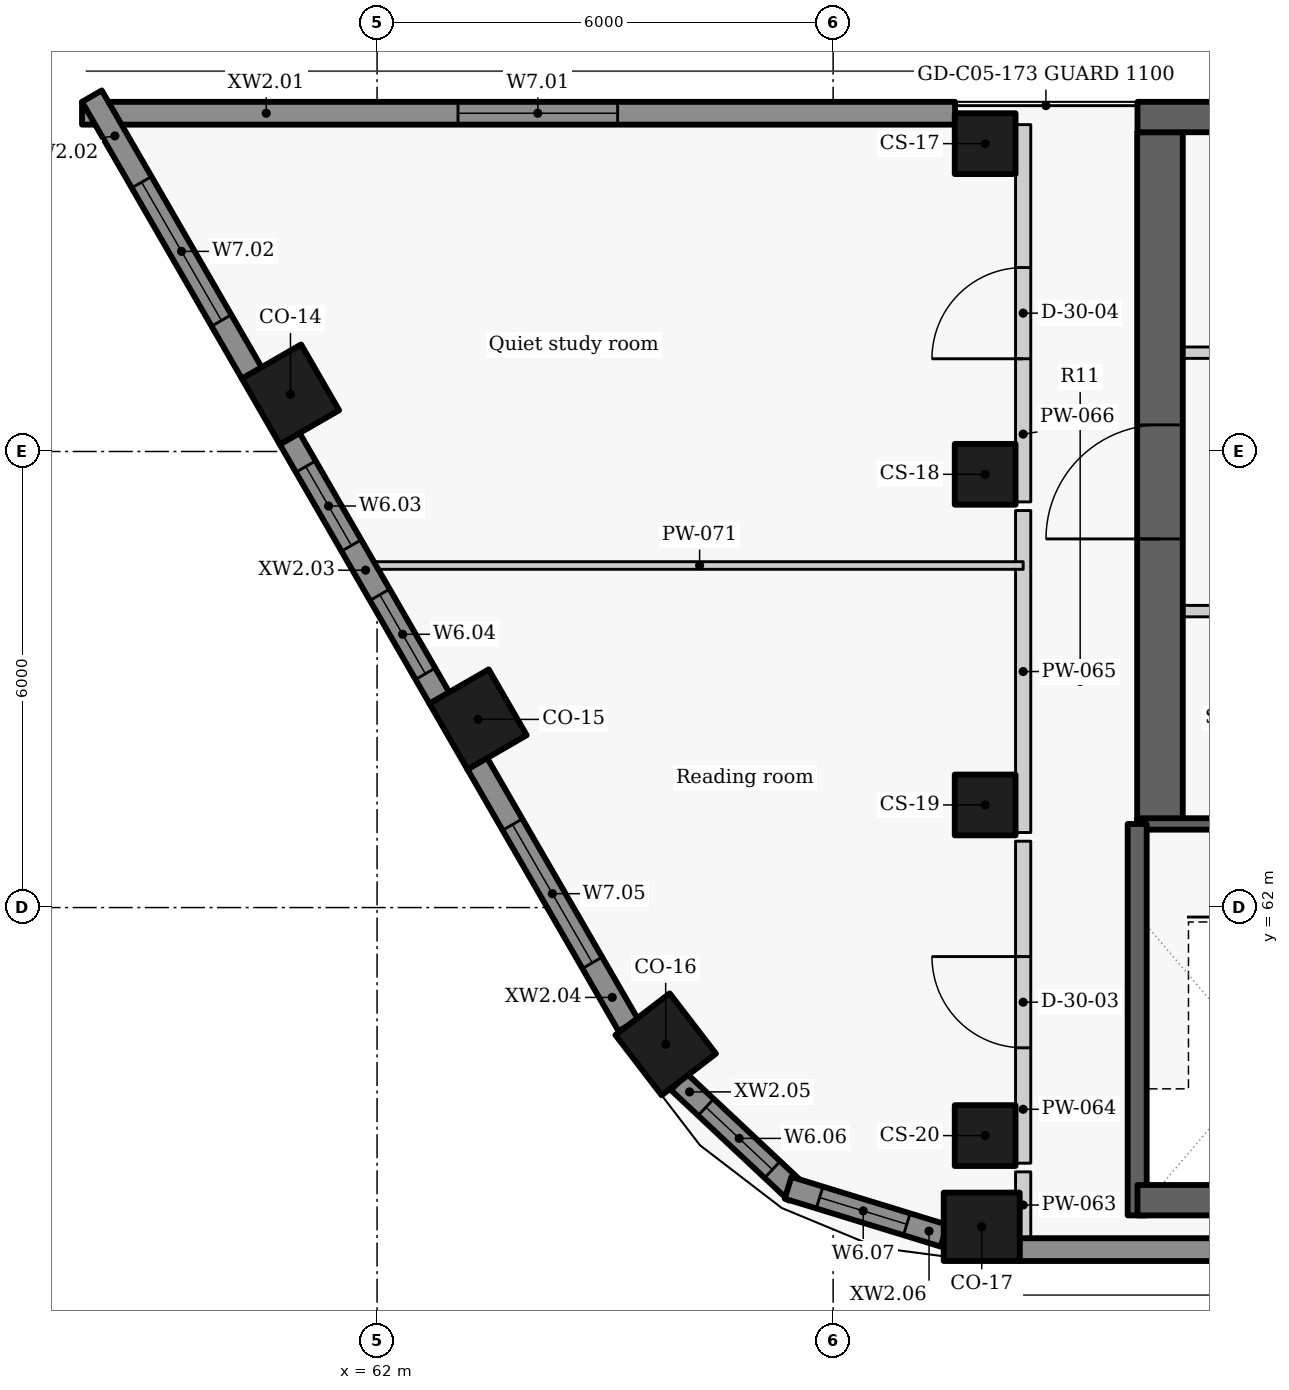
"""IFC4 building model, lengths in metres.
Left out: names, types, materials, properties, quantities, classifications, styles, units other than length and angle.
Written with IfcOpenShell. Run it as: python <this file> out.ifc"""

import sys

from ifc_helpers import new_model, si_unit, direction, frame, frame_2d, origin, origin_2d, place, context, subcontext, project, spatial, rectangle, extrude, element, fill, save


model = new_model("IFC4")
c1 = context("Model", 3, precision=1e-05, world=origin(), true_north=direction((0.0, 1.0)))
c2 = subcontext(c1, "Body", "Model", "MODEL_VIEW")
j1 = project(units=[si_unit("LENGTHUNIT", "METRE"), si_unit("PLANEANGLEUNIT", "RADIAN")], contexts=[c1])
p1 = place(None, origin())
s1 = spatial("IfcSite", under=j1, at=p1, CompositionType="ELEMENT")
p2 = place(p1, origin())
s2 = spatial("IfcBuilding", under=s1, at=p2, CompositionType="ELEMENT")
p3 = place(p2, frame((0.0, 0.0, 286.8)))
s3 = spatial("IfcBuildingStorey", under=s2, at=p3, CompositionType="ELEMENT", Elevation=286.8)
for number, where, z_axis, x_axis in (
    (1, (60.861, 68.75, 0.0), (0.0, 0.0, 1.0), (0.5, -0.866, 0.0)),
    (2, (63.329, 64.475, 0.0), (0.0, 0.0, 1.0), (0.5, -0.866, 0.0)),
    (3, (65.797, 60.2, 0.0), (0.0, 0.0, 1.0), (0.609, -0.793, 0.0)),
    (4, (69.955, 57.8, 0.0), (0.0, 0.0, 1.0), (1.0, 0.0, 0.0)),
):
    element("IfcColumn", number, at=place(p3, frame(where, z_axis=z_axis, x_axis=x_axis)), inside=s3, PredefinedType="COLUMN", context=c2, shape_type="SweptSolid", body=[
        extrude(rectangle(XDim=1.0, YDim=0.9, at=origin_2d()), origin(), (0.0, 0.0, 1.0), 3.6),
    ])
for number, where, z_axis, x_axis in (
    (5, (70.0, 72.05, 0.0), (0.0, 0.0, 1.0), (0.0, -1.0, 0.0)),
    (6, (70.0, 67.7, 0.0), (0.0, 0.0, 1.0), (0.0, -1.0, 0.0)),
    (7, (70.0, 63.35, 0.0), (0.0, 0.0, 1.0), (0.0, -1.0, 0.0)),
    (8, (70.0, 59.0, 0.0), (0.0, 0.0, 1.0), (0.0, -1.0, 0.0)),
):
    element("IfcColumn", number, at=place(p3, frame(where, z_axis=z_axis, x_axis=x_axis)), inside=s3, PredefinedType="COLUMN", context=c2, shape_type="SweptSolid", body=[
        extrude(rectangle(XDim=0.8, YDim=0.8, at=origin_2d()), origin(), (0.0, 0.0, 1.0), 3.6),
    ])
p4 = place(p3, frame((69.604, 72.45, 0.0), z_axis=(0.0, 0.0, 1.0), x_axis=(-1.0, 0.0, 0.0)))
e9 = element("IfcWall", 9, at=p4, inside=s3, PredefinedType="SOLIDWALL", context=c2, shape_type="SweptSolid", body=[
    extrude(rectangle(XDim=11.486, YDim=0.3, at=frame_2d((5.743, 0.0))), origin(), (0.0, 0.0, 1.0), 2.725),
])
p5 = place(p4, frame((4.439, 0.0, 0.9)))
e10 = element("IfcOpeningElement", 10, at=p5, cuts=e9, PredefinedType="OPENING", context=c2, shape_type="SweptSolid", body=[
    extrude(rectangle(XDim=2.1, YDim=1.1, at=frame_2d((1.05, 0.55))), frame((0.0, 0.16, 0.0), z_axis=(0.0, -1.0, 0.0), x_axis=(1.0, 0.0, 0.0)), (0.0, 0.0, 1.0), 0.32),
])
p6 = place(p3, frame((58.248, 72.675, 0.0), z_axis=(0.0, 0.0, 1.0), x_axis=(0.499981865284, -0.866035873614, 0.0)))
e11 = element("IfcWall", 11, at=p6, inside=s3, PredefinedType="SOLIDWALL", context=c2, shape_type="SweptSolid", body=[
    extrude(rectangle(XDim=4.209, YDim=0.3, at=frame_2d((2.104, 0.0))), origin(), (0.0, 0.0, 1.0), 2.725),
])
p7 = place(p6, frame((1.308, 0.0, 0.9)))
e12 = element("IfcOpeningElement", 12, at=p7, cuts=e11, PredefinedType="OPENING", context=c2, shape_type="SweptSolid", body=[
    extrude(rectangle(XDim=2.1, YDim=1.1, at=frame_2d((1.05, 0.55))), frame((0.0, 0.16, 0.0), z_axis=(0.0, -1.0, 0.0), x_axis=(1.0, 0.0, 0.0)), (0.0, 0.0, 1.0), 0.32),
])
p8 = place(p3, frame((60.849, 68.171, 0.0), z_axis=(0.0, 0.0, 1.0), x_axis=(0.499986771468, -0.866033041146, 0.0)))
e13 = element("IfcWall", 13, at=p8, inside=s3, PredefinedType="SOLIDWALL", context=c2, shape_type="SweptSolid", body=[
    extrude(rectangle(XDim=3.944, YDim=0.3, at=frame_2d((1.972, 0.0))), origin(), (0.0, 0.0, 1.0), 2.725),
])
p9 = place(p8, frame((0.426, 0.0, 0.9)))
e14 = element("IfcOpeningElement", 14, at=p9, cuts=e13, PredefinedType="OPENING", context=c2, shape_type="SweptSolid", body=[
    extrude(rectangle(XDim=1.2, YDim=1.1, at=frame_2d((0.6, 0.55))), frame((0.0, 0.16, 0.0), z_axis=(0.0, -1.0, 0.0), x_axis=(1.0, 0.0, 0.0)), (0.0, 0.0, 1.0), 0.32),
])
p10 = place(p8, frame((2.374, 0.0, 0.9)))
e15 = element("IfcOpeningElement", 15, at=p10, cuts=e13, PredefinedType="OPENING", context=c2, shape_type="SweptSolid", body=[
    extrude(rectangle(XDim=1.2, YDim=1.1, at=frame_2d((0.6, 0.55))), frame((0.0, 0.16, 0.0), z_axis=(0.0, -1.0, 0.0), x_axis=(1.0, 0.0, 0.0)), (0.0, 0.0, 1.0), 0.32),
])
p11 = place(p3, frame((63.317, 63.896, 0.0), z_axis=(0.0, 0.0, 1.0), x_axis=(0.500005687176, -0.866022120267, 0.0)))
e16 = element("IfcWall", 16, at=p11, inside=s3, PredefinedType="SOLIDWALL", context=c2, shape_type="SweptSolid", body=[
    extrude(rectangle(XDim=3.979, YDim=0.3, at=frame_2d((1.99, 0.0))), origin(), (0.0, 0.0, 1.0), 2.725),
])
p12 = place(p11, frame((0.928, 0.0, 0.9)))
e17 = element("IfcOpeningElement", 17, at=p12, cuts=e16, PredefinedType="OPENING", context=c2, shape_type="SweptSolid", body=[
    extrude(rectangle(XDim=2.1, YDim=1.1, at=frame_2d((1.05, 0.55))), frame((0.0, 0.16, 0.0), z_axis=(0.0, -1.0, 0.0), x_axis=(1.0, 0.0, 0.0)), (0.0, 0.0, 1.0), 0.32),
])
p13 = place(p3, frame((65.97, 59.708, 0.0), z_axis=(0.0, 0.0, 1.0), x_axis=(0.72926487109, -0.684231501609, 0.0)))
e18 = element("IfcWall", 18, at=p13, inside=s3, PredefinedType="SOLIDWALL", context=c2, shape_type="SweptSolid", body=[
    extrude(rectangle(XDim=2.125, YDim=0.3, at=frame_2d((1.062, 0.0))), origin(), (0.0, 0.0, 1.0), 2.725),
])
p14 = place(p13, frame((0.489, 0.0, 0.9)))
e19 = element("IfcOpeningElement", 19, at=p14, cuts=e18, PredefinedType="OPENING", context=c2, shape_type="SweptSolid", body=[
    extrude(rectangle(XDim=1.2, YDim=1.1, at=frame_2d((0.6, 0.55))), frame((0.0, 0.16, 0.0), z_axis=(0.0, -1.0, 0.0), x_axis=(1.0, 0.0, 0.0)), (0.0, 0.0, 1.0), 0.32),
])
p15 = place(p3, frame((67.407, 58.313, 0.0), z_axis=(0.0, 0.0, 1.0), x_axis=(0.955955937739, -0.293510212944, 0.0)))
e20 = element("IfcWall", 20, at=p15, inside=s3, PredefinedType="SOLIDWALL", context=c2, shape_type="SweptSolid", body=[
    extrude(rectangle(XDim=2.146, YDim=0.3, at=frame_2d((1.073, 0.0))), origin(), (0.0, 0.0, 1.0), 2.725),
])
p16 = place(p15, frame((0.435, 0.0, 0.9)))
e21 = element("IfcOpeningElement", 21, at=p16, cuts=e20, PredefinedType="OPENING", context=c2, shape_type="SweptSolid", body=[
    extrude(rectangle(XDim=1.2, YDim=1.1, at=frame_2d((0.6, 0.55))), frame((0.0, 0.16, 0.0), z_axis=(0.0, -1.0, 0.0), x_axis=(1.0, 0.0, 0.0)), (0.0, 0.0, 1.0), 0.32),
])
p17 = place(p3, frame((70.451, 57.5, 0.0), z_axis=(0.0, 0.0, 1.0), x_axis=(1.0, 0.0, 0.0)))
e22 = element("IfcWall", 22, at=p17, inside=s3, PredefinedType="SOLIDWALL", context=c2, shape_type="SweptSolid", body=[
    extrude(rectangle(XDim=19.093, YDim=0.3, at=frame_2d((9.546, 0.0))), origin(), (0.0, 0.0, 1.0), 2.725),
])
p18 = place(p3, frame((72.0, 69.3, 0.0), z_axis=(0.0, 0.0, 1.0), x_axis=(1.0, 0.0, 0.0)))
e23 = element("IfcWall", 23, at=p18, inside=s3, PredefinedType="PARTITIONING", context=c2, shape_type="SweptSolid", body=[
    extrude(rectangle(XDim=13.4, YDim=0.15, at=frame_2d((6.7, 0.0))), origin(), (0.0, 0.0, 1.0), 3.325),
])
p19 = place(p18, frame((1.175, 0.0, 0.0)))
e24 = element("IfcOpeningElement", 24, at=p19, cuts=e23, PredefinedType="OPENING", context=c2, shape_type="SweptSolid", body=[
    extrude(rectangle(XDim=0.9, YDim=2.1, at=frame_2d((0.45, 1.05))), frame((0.0, 0.085, 0.0), z_axis=(0.0, -1.0, 0.0), x_axis=(1.0, 0.0, 0.0)), (0.0, 0.0, 1.0), 0.17),
])
p20 = place(p18, frame((4.85, 0.0, 0.0)))
e25 = element("IfcOpeningElement", 25, at=p20, cuts=e23, PredefinedType="OPENING", context=c2, shape_type="SweptSolid", body=[
    extrude(rectangle(XDim=0.9, YDim=2.1, at=frame_2d((0.45, 1.05))), frame((0.0, 0.085, 0.0), z_axis=(0.0, -1.0, 0.0), x_axis=(1.0, 0.0, 0.0)), (0.0, 0.0, 1.0), 0.17),
])
p21 = place(p18, frame((8.9, 0.0, 0.0)))
e26 = element("IfcOpeningElement", 26, at=p21, cuts=e23, PredefinedType="OPENING", context=c2, shape_type="SweptSolid", body=[
    extrude(rectangle(XDim=0.9, YDim=2.1, at=frame_2d((0.45, 1.05))), frame((0.0, 0.085, 0.0), z_axis=(0.0, -1.0, 0.0), x_axis=(1.0, 0.0, 0.0)), (0.0, 0.0, 1.0), 0.17),
])
p22 = place(p18, frame((11.6, 0.0, 0.0)))
e27 = element("IfcOpeningElement", 27, at=p22, cuts=e23, PredefinedType="OPENING", context=c2, shape_type="SweptSolid", body=[
    extrude(rectangle(XDim=0.9, YDim=2.1, at=frame_2d((0.45, 1.05))), frame((0.0, 0.085, 0.0), z_axis=(0.0, -1.0, 0.0), x_axis=(1.0, 0.0, 0.0)), (0.0, 0.0, 1.0), 0.17),
])
p23 = place(p3, frame((72.3, 63.1, -0.275), z_axis=(0.0, 0.0, 1.0), x_axis=(0.0, 1.0, 0.0)))
e28 = element("IfcWall", 28, at=p23, inside=s3, PredefinedType="SHEAR", context=c2, shape_type="SweptSolid", body=[
    extrude(rectangle(XDim=9.1, YDim=0.6, at=frame_2d((4.55, 0.0))), origin(), (0.0, 0.0, 1.0), 3.6),
])
p24 = place(p23, frame((3.75, 0.0, 0.275)))
e29 = element("IfcOpeningElement", 29, at=p24, cuts=e28, PredefinedType="OPENING", context=c2, shape_type="SweptSolid", body=[
    extrude(rectangle(XDim=1.5, YDim=2.1, at=frame_2d((0.75, 1.05))), frame((0.0, 0.31, 0.0), z_axis=(0.0, -1.0, 0.0), x_axis=(1.0, 0.0, 0.0)), (0.0, 0.0, 1.0), 0.62),
])
p25 = place(p3, frame((82.703, 65.9, 0.0), z_axis=(0.0, 0.0, 1.0), x_axis=(-1.0, 0.0, 0.0)))
e30 = element("IfcWall", 30, at=p25, inside=s3, PredefinedType="PARTITIONING", context=c2, shape_type="SweptSolid", body=[
    extrude(rectangle(XDim=10.703, YDim=0.15, at=frame_2d((5.352, 0.0))), origin(), (0.0, 0.0, 1.0), 3.325),
])
p26 = place(p25, frame((8.528, 0.0, 0.0)))
e31 = element("IfcOpeningElement", 31, at=p26, cuts=e30, PredefinedType="OPENING", context=c2, shape_type="SweptSolid", body=[
    extrude(rectangle(XDim=1.1, YDim=2.1, at=frame_2d((0.55, 1.05))), frame((0.0, 0.085, 0.0), z_axis=(0.0, -1.0, 0.0), x_axis=(1.0, 0.0, 0.0)), (0.0, 0.0, 1.0), 0.17),
])
p27 = place(p25, frame((6.978, 0.0, 0.0)))
e32 = element("IfcOpeningElement", 32, at=p27, cuts=e30, PredefinedType="OPENING", context=c2, shape_type="SweptSolid", body=[
    extrude(rectangle(XDim=0.9, YDim=2.1, at=frame_2d((0.45, 1.05))), frame((0.0, 0.085, 0.0), z_axis=(0.0, -1.0, 0.0), x_axis=(1.0, 0.0, 0.0)), (0.0, 0.0, 1.0), 0.17),
])
p28 = place(p25, frame((5.628, 0.0, 0.0)))
e33 = element("IfcOpeningElement", 33, at=p28, cuts=e30, PredefinedType="OPENING", context=c2, shape_type="SweptSolid", body=[
    extrude(rectangle(XDim=0.9, YDim=2.1, at=frame_2d((0.45, 1.05))), frame((0.0, 0.085, 0.0), z_axis=(0.0, -1.0, 0.0), x_axis=(1.0, 0.0, 0.0)), (0.0, 0.0, 1.0), 0.17),
])
p29 = place(p25, frame((3.453, 0.0, 0.0)))
e34 = element("IfcOpeningElement", 34, at=p29, cuts=e30, PredefinedType="OPENING", context=c2, shape_type="SweptSolid", body=[
    extrude(rectangle(XDim=1.2, YDim=2.1, at=frame_2d((0.6, 1.05))), frame((0.0, 0.085, 0.0), z_axis=(0.0, -1.0, 0.0), x_axis=(1.0, 0.0, 0.0)), (0.0, 0.0, 1.0), 0.17),
])
p30 = place(p25, frame((0.903, 0.0, 0.0)))
e35 = element("IfcOpeningElement", 35, at=p30, cuts=e30, PredefinedType="OPENING", context=c2, shape_type="SweptSolid", body=[
    extrude(rectangle(XDim=0.9, YDim=2.1, at=frame_2d((0.45, 1.05))), frame((0.0, 0.085, 0.0), z_axis=(0.0, -1.0, 0.0), x_axis=(1.0, 0.0, 0.0)), (0.0, 0.0, 1.0), 0.17),
])
p31 = place(p3, frame((72.0, 63.1, -0.275), z_axis=(0.0, 0.0, 1.0), x_axis=(1.0, 0.0, 0.0)))
e36 = element("IfcWall", 36, at=p31, inside=s3, PredefinedType="SHEAR", context=c2, shape_type="SweptSolid", body=[
    extrude(rectangle(XDim=2.6, YDim=0.15, at=frame_2d((1.3, 0.0))), origin(), (0.0, 0.0, 1.0), 3.6),
])
p32 = place(p31, frame((1.02, 0.0, 0.275)))
e37 = element("IfcOpeningElement", 37, at=p32, cuts=e36, PredefinedType="OPENING", context=c2, shape_type="SweptSolid", body=[
    extrude(rectangle(XDim=1.1, YDim=2.1, at=frame_2d((0.55, 1.05))), frame((0.0, 0.085, 0.0), z_axis=(0.0, -1.0, 0.0), x_axis=(1.0, 0.0, 0.0)), (0.0, 0.0, 1.0), 0.17),
])
p33 = place(p3, frame((72.0, 57.95, -0.275), z_axis=(0.0, 0.0, 1.0), x_axis=(0.0, 1.0, 0.0)))
e38 = element("IfcWall", 38, at=p33, inside=s3, PredefinedType="SHEAR", context=c2, shape_type="SweptSolid", body=[
    extrude(rectangle(XDim=5.15, YDim=0.25, at=frame_2d((2.575, 0.0))), origin(), (0.0, 0.0, 1.0), 3.6),
])
p34 = place(p3, frame((70.5, 57.65, 0.0), z_axis=(0.0, 0.0, 1.0), x_axis=(0.0, 1.0, 0.0)))
e39 = element("IfcWall", 39, at=p34, inside=s3, PredefinedType="PARTITIONING", context=c2, shape_type="SweptSolid", body=[
    extrude(rectangle(XDim=0.873, YDim=0.2, at=frame_2d((0.437, 0.0))), origin(), (0.0, 0.0, 1.0), 3.325),
])
p35 = place(p3, frame((70.5, 58.637, 0.0), z_axis=(0.0, 0.0, 1.0), x_axis=(0.0, 1.0, 0.0)))
e40 = element("IfcWall", 40, at=p35, inside=s3, PredefinedType="PARTITIONING", context=c2, shape_type="SweptSolid", body=[
    extrude(rectangle(XDim=4.236, YDim=0.2, at=frame_2d((2.118, 0.0))), origin(), (0.0, 0.0, 1.0), 3.325),
])
p36 = place(p35, frame((1.518, 0.0, 0.0)))
e41 = element("IfcOpeningElement", 41, at=p36, cuts=e40, PredefinedType="OPENING", context=c2, shape_type="SweptSolid", body=[
    extrude(rectangle(XDim=1.2, YDim=2.1, at=frame_2d((0.6, 1.05))), frame((0.0, 0.11, 0.0), z_axis=(0.0, -1.0, 0.0), x_axis=(1.0, 0.0, 0.0)), (0.0, 0.0, 1.0), 0.22),
])
p37 = place(p3, frame((70.5, 62.987, 0.0), z_axis=(0.0, 0.0, 1.0), x_axis=(0.0, 1.0, 0.0)))
e42 = element("IfcWall", 42, at=p37, inside=s3, PredefinedType="PARTITIONING", context=c2, shape_type="SweptSolid", body=[
    extrude(rectangle(XDim=4.236, YDim=0.2, at=frame_2d((2.118, 0.0))), origin(), (0.0, 0.0, 1.0), 3.325),
])
p38 = place(p3, frame((70.5, 67.337, 0.0), z_axis=(0.0, 0.0, 1.0), x_axis=(0.0, 1.0, 0.0)))
e43 = element("IfcWall", 43, at=p38, inside=s3, PredefinedType="PARTITIONING", context=c2, shape_type="SweptSolid", body=[
    extrude(rectangle(XDim=4.963, YDim=0.2, at=frame_2d((2.481, 0.0))), origin(), (0.0, 0.0, 1.0), 3.325),
])
p39 = place(p38, frame((1.883, 0.0, 0.0)))
e44 = element("IfcOpeningElement", 44, at=p39, cuts=e43, PredefinedType="OPENING", context=c2, shape_type="SweptSolid", body=[
    extrude(rectangle(XDim=1.2, YDim=2.1, at=frame_2d((0.6, 1.05))), frame((0.0, 0.11, 0.0), z_axis=(0.0, -1.0, 0.0), x_axis=(1.0, 0.0, 0.0)), (0.0, 0.0, 1.0), 0.22),
])
p40 = place(p3, frame((61.987, 66.5, 0.0), z_axis=(0.0, 0.0, 1.0), x_axis=(1.0, 0.0, 0.0)))
e45 = element("IfcWall", 45, at=p40, inside=s3, PredefinedType="PARTITIONING", context=c2, shape_type="SweptSolid", body=[
    extrude(rectangle(XDim=8.513, YDim=0.1, at=frame_2d((4.257, 0.0))), origin(), (0.0, 0.0, 1.0), 3.325),
])
p41 = place(p3, frame((72.004, 72.4, -0.275), z_axis=(0.0, 0.0, 1.0), x_axis=(1.0, 0.0, 0.0)))
e46 = element("IfcWall", 46, at=p41, inside=s3, PredefinedType="SHEAR", context=c2, shape_type="SweptSolid", body=[
    extrude(rectangle(XDim=13.396, YDim=0.4, at=frame_2d((6.698, 0.0))), origin(), (0.0, 0.0, 1.0), 3.6),
])
p42 = place(p3, frame((72.004, 58.15, -0.275), z_axis=(0.0, 0.0, 1.0), x_axis=(1.0, 0.0, 0.0)))
e47 = element("IfcWall", 47, at=p42, inside=s3, PredefinedType="SHEAR", context=c2, shape_type="SweptSolid", body=[
    extrude(rectangle(XDim=15.992, YDim=0.4, at=frame_2d((7.996, 0.0))), origin(), (0.0, 0.0, 1.0), 3.6),
])
p43 = place(p5, origin())
e48 = element("IfcWindow", 48, at=p43, inside=s3, PartitioningType="SINGLE_PANEL", PredefinedType="WINDOW", context=c2, shape_type="SweptSolid", body=[
    extrude(rectangle(XDim=2.1, YDim=1.1, at=frame_2d((1.05, 0.55))), frame((0.0, 0.03, 0.0), z_axis=(0.0, -1.0, 0.0), x_axis=(1.0, 0.0, 0.0)), (0.0, 0.0, 1.0), 0.06),
])
fill(e10, e48)
p44 = place(p7, origin())
e49 = element("IfcWindow", 49, at=p44, inside=s3, PartitioningType="SINGLE_PANEL", PredefinedType="WINDOW", context=c2, shape_type="SweptSolid", body=[
    extrude(rectangle(XDim=2.1, YDim=1.1, at=frame_2d((1.05, 0.55))), frame((0.0, 0.03, 0.0), z_axis=(0.0, -1.0, 0.0), x_axis=(1.0, 0.0, 0.0)), (0.0, 0.0, 1.0), 0.06),
])
fill(e12, e49)
p45 = place(p9, origin())
e50 = element("IfcWindow", 50, at=p45, inside=s3, PartitioningType="SINGLE_PANEL", PredefinedType="WINDOW", context=c2, shape_type="SweptSolid", body=[
    extrude(rectangle(XDim=1.2, YDim=1.1, at=frame_2d((0.6, 0.55))), frame((0.0, 0.03, 0.0), z_axis=(0.0, -1.0, 0.0), x_axis=(1.0, 0.0, 0.0)), (0.0, 0.0, 1.0), 0.06),
])
fill(e14, e50)
p46 = place(p10, origin())
e51 = element("IfcWindow", 51, at=p46, inside=s3, PartitioningType="SINGLE_PANEL", PredefinedType="WINDOW", context=c2, shape_type="SweptSolid", body=[
    extrude(rectangle(XDim=1.2, YDim=1.1, at=frame_2d((0.6, 0.55))), frame((0.0, 0.03, 0.0), z_axis=(0.0, -1.0, 0.0), x_axis=(1.0, 0.0, 0.0)), (0.0, 0.0, 1.0), 0.06),
])
fill(e15, e51)
p47 = place(p12, origin())
e52 = element("IfcWindow", 52, at=p47, inside=s3, PartitioningType="SINGLE_PANEL", PredefinedType="WINDOW", context=c2, shape_type="SweptSolid", body=[
    extrude(rectangle(XDim=2.1, YDim=1.1, at=frame_2d((1.05, 0.55))), frame((0.0, 0.03, 0.0), z_axis=(0.0, -1.0, 0.0), x_axis=(1.0, 0.0, 0.0)), (0.0, 0.0, 1.0), 0.06),
])
fill(e17, e52)
p48 = place(p14, origin())
e53 = element("IfcWindow", 53, at=p48, inside=s3, PartitioningType="SINGLE_PANEL", PredefinedType="WINDOW", context=c2, shape_type="SweptSolid", body=[
    extrude(rectangle(XDim=1.2, YDim=1.1, at=frame_2d((0.6, 0.55))), frame((0.0, 0.03, 0.0), z_axis=(0.0, -1.0, 0.0), x_axis=(1.0, 0.0, 0.0)), (0.0, 0.0, 1.0), 0.06),
])
fill(e19, e53)
p49 = place(p16, origin())
e54 = element("IfcWindow", 54, at=p49, inside=s3, PartitioningType="SINGLE_PANEL", PredefinedType="WINDOW", context=c2, shape_type="SweptSolid", body=[
    extrude(rectangle(XDim=1.2, YDim=1.1, at=frame_2d((0.6, 0.55))), frame((0.0, 0.03, 0.0), z_axis=(0.0, -1.0, 0.0), x_axis=(1.0, 0.0, 0.0)), (0.0, 0.0, 1.0), 0.06),
])
fill(e21, e54)
p50 = place(p36, origin())
e55 = element("IfcDoor", 55, at=p50, inside=s3, OperationType="SINGLE_SWING_RIGHT", PredefinedType="DOOR", context=c2, shape_type="SweptSolid", body=[
    extrude(rectangle(XDim=1.2, YDim=2.1, at=frame_2d((0.6, 1.05))), frame((0.0, 0.025, 0.0), z_axis=(0.0, -1.0, 0.0), x_axis=(1.0, 0.0, 0.0)), (0.0, 0.0, 1.0), 0.05),
])
fill(e41, e55)
p51 = place(p39, origin())
e56 = element("IfcDoor", 56, at=p51, inside=s3, OperationType="SINGLE_SWING_LEFT", PredefinedType="DOOR", context=c2, shape_type="SweptSolid", body=[
    extrude(rectangle(XDim=1.2, YDim=2.1, at=frame_2d((0.6, 1.05))), frame((0.0, 0.025, 0.0), z_axis=(0.0, -1.0, 0.0), x_axis=(1.0, 0.0, 0.0)), (0.0, 0.0, 1.0), 0.05),
])
fill(e44, e56)
p52 = place(p24, origin())
e57 = element("IfcDoor", 57, at=p52, inside=s3, OperationType="DOUBLE_DOOR_SINGLE_SWING", PredefinedType="DOOR", context=c2, shape_type="SweptSolid", body=[
    extrude(rectangle(XDim=1.5, YDim=2.1, at=frame_2d((0.75, 1.05))), frame((0.0, 0.025, 0.0), z_axis=(0.0, -1.0, 0.0), x_axis=(1.0, 0.0, 0.0)), (0.0, 0.0, 1.0), 0.05),
])
fill(e29, e57)
save(model, sys.argv[1])
